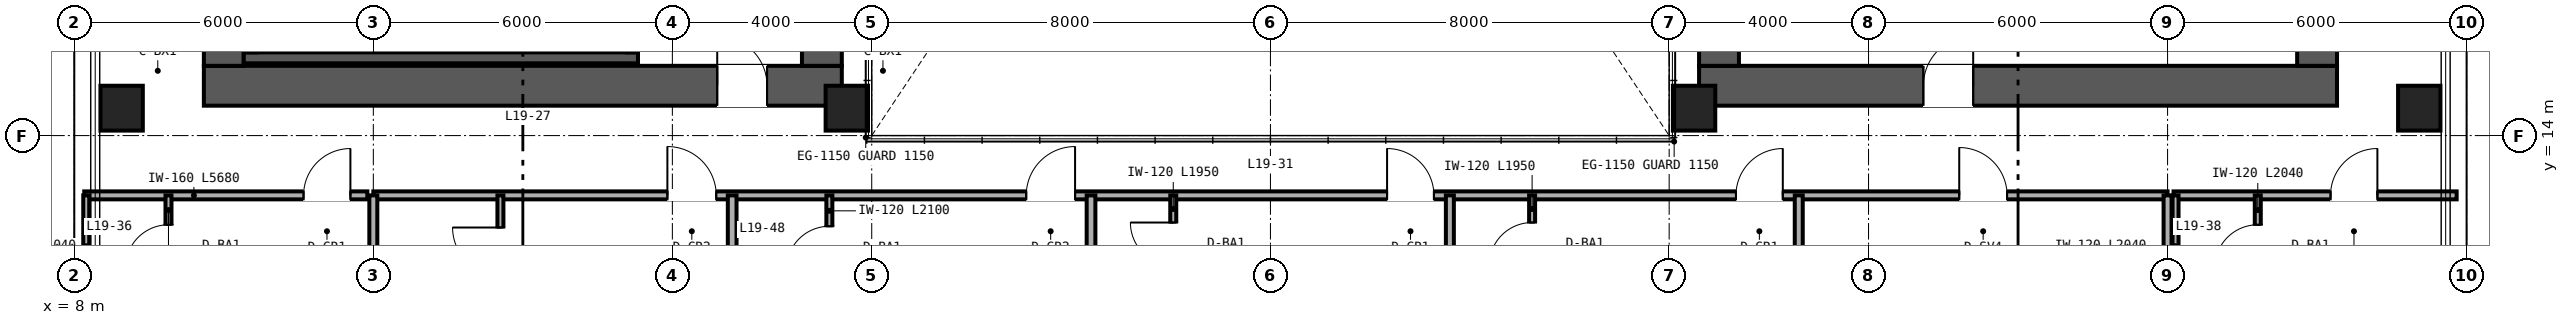
"""IFC4 building model, lengths in metres.
Left out: names, types, materials, properties, quantities, classifications, styles, units other than length and angle.
Written with IfcOpenShell. Run it as: python <this file> out.ifc"""

import sys

from ifc_helpers import new_model, si_unit, direction, frame, frame_2d, origin, origin_2d, place, context, subcontext, project, spatial, rectangle, hollow_rectangle, extrude, source, transform, mapped, element, fill, save


model = new_model("IFC4")
c1 = context("Model", 3, precision=1e-05, world=origin(), true_north=direction((0.0, 1.0)))
c2 = subcontext(c1, "Body", "Model", "MODEL_VIEW")
j1 = project(units=[si_unit("LENGTHUNIT", "METRE"), si_unit("PLANEANGLEUNIT", "RADIAN")], contexts=[c1])
p1 = place(None, origin())
s1 = spatial("IfcSite", under=j1, at=p1, CompositionType="ELEMENT")
p2 = place(p1, origin())
s2 = spatial("IfcBuilding", under=s1, at=p2, CompositionType="ELEMENT")
p3 = place(p2, frame((0.0, 0.0, 78.0)))
s3 = spatial("IfcBuildingStorey", under=s2, at=p3, CompositionType="ELEMENT", Elevation=78.0)
p4 = place(p3, frame((10.6, 15.0, 0.0), z_axis=(0.0, 0.0, 1.0), x_axis=(1.0, 0.0, 0.0)))
e1 = element("IfcWall", 1, at=p4, inside=s3, PredefinedType="SHEAR", context=c2, shape_type="SweptSolid", body=[
    extrude(rectangle(XDim=12.8, YDim=0.8, at=frame_2d((6.4, 0.0))), origin(), (0.0, 0.0, 1.0), 3.35),
])
p5 = place(p4, frame((10.3, 0.0, 0.0)))
e2 = element("IfcOpeningElement", 2, at=p5, cuts=e1, PredefinedType="OPENING", context=c2, shape_type="SweptSolid", body=[
    extrude(rectangle(XDim=1.0, YDim=2.15, at=frame_2d((0.5, 1.075))), frame((0.0, 0.41, 0.0), z_axis=(0.0, -1.0, 0.0), x_axis=(1.0, 0.0, 0.0)), (0.0, 0.0, 1.0), 0.82),
])
for number, where, z_axis, x_axis in (
    (3, (11.0, 15.4, 0.0), (0.0, 0.0, 1.0), (0.0, 1.0, 0.0)),
    (4, (23.0, 15.4, 0.0), (0.0, 0.0, 1.0), (0.0, 1.0, 0.0)),
):
    element("IfcWall", number, at=place(p3, frame(where, z_axis=z_axis, x_axis=x_axis)), inside=s3, PredefinedType="SHEAR", context=c2, shape_type="SweptSolid", body=[
        extrude(rectangle(XDim=21.2, YDim=0.8, at=frame_2d((10.6, 0.0))), origin(), (0.0, 0.0, 1.0), 3.35),
    ])
p6 = place(p3, frame((40.6, 15.0, 0.0), z_axis=(0.0, 0.0, 1.0), x_axis=(1.0, 0.0, 0.0)))
e5 = element("IfcWall", 5, at=p6, inside=s3, PredefinedType="SHEAR", context=c2, shape_type="SweptSolid", body=[
    extrude(rectangle(XDim=12.8, YDim=0.8, at=frame_2d((6.4, 0.0))), origin(), (0.0, 0.0, 1.0), 3.35),
])
p7 = place(p6, frame((4.5, 0.0, 0.0)))
e6 = element("IfcOpeningElement", 6, at=p7, cuts=e5, PredefinedType="OPENING", context=c2, shape_type="SweptSolid", body=[
    extrude(rectangle(XDim=1.0, YDim=2.15, at=frame_2d((0.5, 1.075))), frame((0.0, 0.41, 0.0), z_axis=(0.0, -1.0, 0.0), x_axis=(1.0, 0.0, 0.0)), (0.0, 0.0, 1.0), 0.82),
])
for number, where, z_axis, x_axis in (
    (7, (41.0, 15.4, 0.0), (0.0, 0.0, 1.0), (0.0, 1.0, 0.0)),
    (8, (53.0, 15.4, 0.0), (0.0, 0.0, 1.0), (0.0, 1.0, 0.0)),
):
    element("IfcWall", number, at=place(p3, frame(where, z_axis=z_axis, x_axis=x_axis)), inside=s3, PredefinedType="SHEAR", context=c2, shape_type="SweptSolid", body=[
        extrude(rectangle(XDim=21.2, YDim=0.8, at=frame_2d((10.6, 0.0))), origin(), (0.0, 0.0, 1.0), 3.35),
    ])
p8 = place(p3, frame((11.4, 15.56, 0.0), z_axis=(0.0, 0.0, 1.0), x_axis=(1.0, 0.0, 0.0)))
e9 = element("IfcWall", 9, at=p8, inside=s3, PredefinedType="SHEAR", context=c2, shape_type="SweptSolid", body=[
    extrude(rectangle(XDim=7.91, YDim=0.22, at=frame_2d((3.955, 0.0))), origin(), (0.0, 0.0, 1.0), 3.4),
])
for number, where, z_axis, x_axis in (
    (10, (11.56, 15.67, 0.0), (0.0, 0.0, 1.0), (0.0, 1.0, 0.0)),
    (11, (19.2, 15.67, 0.0), (0.0, 0.0, 1.0), (0.0, 1.0, 0.0)),
):
    element("IfcWall", number, at=place(p3, frame(where, z_axis=z_axis, x_axis=x_axis)), inside=s3, PredefinedType="SHEAR", context=c2, shape_type="SweptSolid", body=[
        extrude(rectangle(XDim=3.28, YDim=0.22, at=frame_2d((1.64, 0.0))), origin(), (0.0, 0.0, 1.0), 3.4),
    ])
m1 = source(origin(), c2, "Body", "SweptSolid", [
    extrude(hollow_rectangle(XDim=0.85, YDim=0.9, WallThickness=0.04, at=origin_2d()), origin(), (0.0, 0.0, 1.0), 3.35),
])
for number, where, z_axis, x_axis in (
    (12, (8.95, 14.55, 0.0), (0.0, 0.0, 1.0), (1.0, 0.0, 0.0)),
    (13, (23.5, 14.55, 0.0), (0.0, 0.0, 1.0), (1.0, 0.0, 0.0)),
    (14, (40.5, 14.55, 0.0), (0.0, 0.0, 1.0), (1.0, 0.0, 0.0)),
    (15, (55.05, 14.55, 0.0), (0.0, 0.0, 1.0), (1.0, 0.0, 0.0)),
):
    element("IfcColumn", number, at=place(p3, frame(where, z_axis=z_axis, x_axis=x_axis)), inside=s3, PredefinedType="COLUMN", context=c2, shape_type="MappedRepresentation", body=[
        mapped(m1, transform((0.0, 0.0, 0.0), scale=1.0)),
    ])
p9 = place(p3, frame((8.2, 12.8, 0.0), z_axis=(0.0, 0.0, 1.0), x_axis=(1.0, 0.0, 0.0)))
e16 = element("IfcWall", 16, at=p9, inside=s3, PredefinedType="PARTITIONING", context=c2, shape_type="SweptSolid", body=[
    extrude(rectangle(XDim=5.68, YDim=0.16, at=frame_2d((2.84, 0.0))), origin(), (0.0, 0.0, 1.0), 3.35),
])
p10 = place(p9, frame((4.4, 0.0, 0.0)))
e17 = element("IfcOpeningElement", 17, at=p10, cuts=e16, PredefinedType="OPENING", context=c2, shape_type="SweptSolid", body=[
    extrude(rectangle(XDim=0.94, YDim=2.15, at=frame_2d((0.47, 1.075))), frame((0.0, 0.09, 0.0), z_axis=(0.0, -1.0, 0.0), x_axis=(1.0, 0.0, 0.0)), (0.0, 0.0, 1.0), 0.18),
])
p11 = place(p3, frame((9.89, 10.76, 0.0), z_axis=(0.0, 0.0, 1.0), x_axis=(0.0, 1.0, 0.0)))
e18 = element("IfcWall", 18, at=p11, inside=s3, PredefinedType="PARTITIONING", context=c2, shape_type="SweptSolid", body=[
    extrude(rectangle(XDim=2.04, YDim=0.12, at=frame_2d((1.02, 0.0))), origin(), (0.0, 0.0, 1.0), 3.35),
])
p12 = place(p11, frame((0.59, 0.0, 0.0)))
e19 = element("IfcOpeningElement", 19, at=p12, cuts=e18, PredefinedType="OPENING", context=c2, shape_type="SweptSolid", body=[
    extrude(rectangle(XDim=0.86, YDim=2.1, at=frame_2d((0.43, 1.05))), frame((0.0, 0.07, 0.0), z_axis=(0.0, -1.0, 0.0), x_axis=(1.0, 0.0, 0.0)), (0.0, 0.0, 1.0), 0.14),
])
p13 = place(p3, frame((8.24, 10.76, 0.0), z_axis=(0.0, 0.0, 1.0), x_axis=(0.0, 1.0, 0.0)))
e20 = element("IfcWall", 20, at=p13, inside=s3, PredefinedType="PARTITIONING", context=c2, shape_type="SweptSolid", body=[
    extrude(rectangle(XDim=2.04, YDim=0.12, at=frame_2d((1.02, 0.0))), origin(), (0.0, 0.0, 1.0), 3.35),
])
p14 = place(p3, frame((50.12, 12.8, 0.0), z_axis=(0.0, 0.0, 1.0), x_axis=(1.0, 0.0, 0.0)))
e21 = element("IfcWall", 21, at=p14, inside=s3, PredefinedType="PARTITIONING", context=c2, shape_type="SweptSolid", body=[
    extrude(rectangle(XDim=5.68, YDim=0.16, at=frame_2d((2.84, 0.0))), origin(), (0.0, 0.0, 1.0), 3.35),
])
p15 = place(p14, frame((3.15, 0.0, 0.0)))
e22 = element("IfcOpeningElement", 22, at=p15, cuts=e21, PredefinedType="OPENING", context=c2, shape_type="SweptSolid", body=[
    extrude(rectangle(XDim=0.94, YDim=2.15, at=frame_2d((0.47, 1.075))), frame((0.0, 0.09, 0.0), z_axis=(0.0, -1.0, 0.0), x_axis=(1.0, 0.0, 0.0)), (0.0, 0.0, 1.0), 0.18),
])
p16 = place(p3, frame((51.81, 10.76, 0.0), z_axis=(0.0, 0.0, 1.0), x_axis=(0.0, 1.0, 0.0)))
e23 = element("IfcWall", 23, at=p16, inside=s3, PredefinedType="PARTITIONING", context=c2, shape_type="SweptSolid", body=[
    extrude(rectangle(XDim=2.04, YDim=0.12, at=frame_2d((1.02, 0.0))), origin(), (0.0, 0.0, 1.0), 3.35),
])
p17 = place(p16, frame((0.59, 0.0, 0.0)))
e24 = element("IfcOpeningElement", 24, at=p17, cuts=e23, PredefinedType="OPENING", context=c2, shape_type="SweptSolid", body=[
    extrude(rectangle(XDim=0.86, YDim=2.1, at=frame_2d((0.43, 1.05))), frame((0.0, 0.07, 0.0), z_axis=(0.0, -1.0, 0.0), x_axis=(1.0, 0.0, 0.0)), (0.0, 0.0, 1.0), 0.14),
])
p18 = place(p3, frame((50.16, 10.76, 0.0), z_axis=(0.0, 0.0, 1.0), x_axis=(0.0, 1.0, 0.0)))
e25 = element("IfcWall", 25, at=p18, inside=s3, PredefinedType="PARTITIONING", context=c2, shape_type="SweptSolid", body=[
    extrude(rectangle(XDim=2.04, YDim=0.12, at=frame_2d((1.02, 0.0))), origin(), (0.0, 0.0, 1.0), 3.35),
])
p19 = place(p3, frame((14.0, 12.8, 0.0), z_axis=(0.0, 0.0, 1.0), x_axis=(1.0, 0.0, 0.0)))
e26 = element("IfcWall", 26, at=p19, inside=s3, PredefinedType="PARTITIONING", context=c2, shape_type="SweptSolid", body=[
    extrude(rectangle(XDim=36.0, YDim=0.16, at=frame_2d((18.0, 0.0))), origin(), (0.0, 0.0, 1.0), 2.571),
])
p20 = place(p19, frame((5.9, 0.0, 0.0)))
e27 = element("IfcOpeningElement", 27, at=p20, cuts=e26, PredefinedType="OPENING", context=c2, shape_type="SweptSolid", body=[
    extrude(rectangle(XDim=0.98, YDim=2.2, at=frame_2d((0.49, 1.1))), frame((0.0, 0.09, 0.0), z_axis=(0.0, -1.0, 0.0), x_axis=(1.0, 0.0, 0.0)), (0.0, 0.0, 1.0), 0.18),
])
p21 = place(p19, frame((13.1, 0.0, 0.0)))
e28 = element("IfcOpeningElement", 28, at=p21, cuts=e26, PredefinedType="OPENING", context=c2, shape_type="SweptSolid", body=[
    extrude(rectangle(XDim=0.98, YDim=2.2, at=frame_2d((0.49, 1.1))), frame((0.0, 0.09, 0.0), z_axis=(0.0, -1.0, 0.0), x_axis=(1.0, 0.0, 0.0)), (0.0, 0.0, 1.0), 0.18),
])
p22 = place(p19, frame((20.34, 0.0, 0.0)))
e29 = element("IfcOpeningElement", 29, at=p22, cuts=e26, PredefinedType="OPENING", context=c2, shape_type="SweptSolid", body=[
    extrude(rectangle(XDim=0.94, YDim=2.15, at=frame_2d((0.47, 1.075))), frame((0.0, 0.09, 0.0), z_axis=(0.0, -1.0, 0.0), x_axis=(1.0, 0.0, 0.0)), (0.0, 0.0, 1.0), 0.18),
])
p23 = place(p19, frame((27.34, 0.0, 0.0)))
e30 = element("IfcOpeningElement", 30, at=p23, cuts=e26, PredefinedType="OPENING", context=c2, shape_type="SweptSolid", body=[
    extrude(rectangle(XDim=0.94, YDim=2.15, at=frame_2d((0.47, 1.075))), frame((0.0, 0.09, 0.0), z_axis=(0.0, -1.0, 0.0), x_axis=(1.0, 0.0, 0.0)), (0.0, 0.0, 1.0), 0.18),
])
p24 = place(p19, frame((31.82, 0.0, 0.0)))
e31 = element("IfcOpeningElement", 31, at=p24, cuts=e26, PredefinedType="OPENING", context=c2, shape_type="SweptSolid", body=[
    extrude(rectangle(XDim=0.96, YDim=2.15, at=frame_2d((0.48, 1.075))), frame((0.0, 0.09, 0.0), z_axis=(0.0, -1.0, 0.0), x_axis=(1.0, 0.0, 0.0)), (0.0, 0.0, 1.0), 0.18),
])
for number, where, z_axis, x_axis in (
    (32, (14.0, 2.36, 0.0), (0.0, 0.0, 1.0), (0.0, 1.0, 0.0)),
    (33, (50.0, 2.36, 0.0), (0.0, 0.0, 1.0), (0.0, 1.0, 0.0)),
):
    element("IfcWall", number, at=place(p3, frame(where, z_axis=z_axis, x_axis=x_axis)), inside=s3, PredefinedType="PARTITIONING", context=c2, shape_type="SweptSolid", body=[
        extrude(rectangle(XDim=10.44, YDim=0.16, at=frame_2d((5.22, 0.0))), origin(), (0.0, 0.0, 1.0), 2.657),
    ])
p25 = place(p3, frame((21.2, 2.36, 0.0), z_axis=(0.0, 0.0, 1.0), x_axis=(0.0, 1.0, 0.0)))
e34 = element("IfcWall", 34, at=p25, inside=s3, PredefinedType="PARTITIONING", context=c2, shape_type="SweptSolid", body=[
    extrude(rectangle(XDim=10.44, YDim=0.175, at=frame_2d((5.22, 0.0))), origin(), (0.0, 0.0, 1.0), 2.813),
])
p26 = place(p3, frame((16.55, 10.55, 0.0), z_axis=(0.0, 0.0, 1.0), x_axis=(0.0, 1.0, 0.0)))
e35 = element("IfcWall", 35, at=p26, inside=s3, PredefinedType="PARTITIONING", context=c2, shape_type="SweptSolid", body=[
    extrude(rectangle(XDim=2.25, YDim=0.12, at=frame_2d((1.125, 0.0))), origin(), (0.0, 0.0, 1.0), 3.35),
])
p27 = place(p26, frame((0.645, 0.0, 0.0)))
e36 = element("IfcOpeningElement", 36, at=p27, cuts=e35, PredefinedType="OPENING", context=c2, shape_type="SweptSolid", body=[
    extrude(rectangle(XDim=0.96, YDim=2.15, at=frame_2d((0.48, 1.075))), frame((0.0, 0.07, 0.0), z_axis=(0.0, -1.0, 0.0), x_axis=(1.0, 0.0, 0.0)), (0.0, 0.0, 1.0), 0.14),
])
p28 = place(p3, frame((28.4, 2.36, 0.0), z_axis=(0.0, 0.0, 1.0), x_axis=(0.0, 1.0, 0.0)))
e37 = element("IfcWall", 37, at=p28, inside=s3, PredefinedType="PARTITIONING", context=c2, shape_type="SweptSolid", body=[
    extrude(rectangle(XDim=10.44, YDim=0.175, at=frame_2d((5.22, 0.0))), origin(), (0.0, 0.0, 1.0), 2.423),
])
p29 = place(p3, frame((23.15, 10.7, 0.0), z_axis=(0.0, 0.0, 1.0), x_axis=(0.0, 1.0, 0.0)))
e38 = element("IfcWall", 38, at=p29, inside=s3, PredefinedType="PARTITIONING", context=c2, shape_type="SweptSolid", body=[
    extrude(rectangle(XDim=2.1, YDim=0.12, at=frame_2d((1.05, 0.0))), origin(), (0.0, 0.0, 1.0), 3.35),
])
p30 = place(p29, frame((0.62, 0.0, 0.0)))
e39 = element("IfcOpeningElement", 39, at=p30, cuts=e38, PredefinedType="OPENING", context=c2, shape_type="SweptSolid", body=[
    extrude(rectangle(XDim=0.86, YDim=2.1, at=frame_2d((0.43, 1.05))), frame((0.0, 0.07, 0.0), z_axis=(0.0, -1.0, 0.0), x_axis=(1.0, 0.0, 0.0)), (0.0, 0.0, 1.0), 0.14),
])
p31 = place(p3, frame((35.6, 2.36, 0.0), z_axis=(0.0, 0.0, 1.0), x_axis=(0.0, 1.0, 0.0)))
e40 = element("IfcWall", 40, at=p31, inside=s3, PredefinedType="PARTITIONING", context=c2, shape_type="SweptSolid", body=[
    extrude(rectangle(XDim=10.44, YDim=0.16, at=frame_2d((5.22, 0.0))), origin(), (0.0, 0.0, 1.0), 2.423),
])
p32 = place(p3, frame((30.05, 10.85, 0.0), z_axis=(0.0, 0.0, 1.0), x_axis=(0.0, 1.0, 0.0)))
e41 = element("IfcWall", 41, at=p32, inside=s3, PredefinedType="PARTITIONING", context=c2, shape_type="SweptSolid", body=[
    extrude(rectangle(XDim=1.95, YDim=0.12, at=frame_2d((0.975, 0.0))), origin(), (0.0, 0.0, 1.0), 3.35),
])
p33 = place(p32, frame((0.545, 0.0, 0.0)))
e42 = element("IfcOpeningElement", 42, at=p33, cuts=e41, PredefinedType="OPENING", context=c2, shape_type="SweptSolid", body=[
    extrude(rectangle(XDim=0.86, YDim=2.1, at=frame_2d((0.43, 1.05))), frame((0.0, 0.07, 0.0), z_axis=(0.0, -1.0, 0.0), x_axis=(1.0, 0.0, 0.0)), (0.0, 0.0, 1.0), 0.14),
])
p34 = place(p3, frame((42.6, 2.36, 0.0), z_axis=(0.0, 0.0, 1.0), x_axis=(0.0, 1.0, 0.0)))
e43 = element("IfcWall", 43, at=p34, inside=s3, PredefinedType="PARTITIONING", context=c2, shape_type="SweptSolid", body=[
    extrude(rectangle(XDim=10.44, YDim=0.16, at=frame_2d((5.22, 0.0))), origin(), (0.0, 0.0, 1.0), 2.813),
])
p35 = place(p3, frame((37.25, 10.85, 0.0), z_axis=(0.0, 0.0, 1.0), x_axis=(0.0, 1.0, 0.0)))
e44 = element("IfcWall", 44, at=p35, inside=s3, PredefinedType="PARTITIONING", context=c2, shape_type="SweptSolid", body=[
    extrude(rectangle(XDim=1.95, YDim=0.12, at=frame_2d((0.975, 0.0))), origin(), (0.0, 0.0, 1.0), 3.35),
])
p36 = place(p35, frame((0.545, 0.0, 0.0)))
e45 = element("IfcOpeningElement", 45, at=p36, cuts=e44, PredefinedType="OPENING", context=c2, shape_type="SweptSolid", body=[
    extrude(rectangle(XDim=0.86, YDim=2.1, at=frame_2d((0.43, 1.05))), frame((0.0, 0.07, 0.0), z_axis=(0.0, -1.0, 0.0), x_axis=(1.0, 0.0, 0.0)), (0.0, 0.0, 1.0), 0.14),
])
m2 = source(origin(), c2, "Body", "SweptSolid", [
    extrude(rectangle(XDim=1.0, YDim=2.15, at=frame_2d((0.5, 1.075))), frame((0.0, 0.025, 0.0), z_axis=(0.0, -1.0, 0.0), x_axis=(1.0, 0.0, 0.0)), (0.0, 0.0, 1.0), 0.05),
])
p37 = place(p5, origin())
e46 = element("IfcDoor", 46, at=p37, inside=s3, OperationType="SINGLE_SWING_LEFT", PredefinedType="DOOR", context=c2, shape_type="MappedRepresentation", body=[
    mapped(m2, transform((0.0, 0.0, 0.0), scale=1.0)),
])
fill(e2, e46)
p38 = place(p7, origin())
e47 = element("IfcDoor", 47, at=p38, inside=s3, OperationType="SINGLE_SWING_RIGHT", PredefinedType="DOOR", context=c2, shape_type="MappedRepresentation", body=[
    mapped(m2, transform((0.0, 0.0, 0.0), scale=1.0)),
])
fill(e6, e47)
m3 = source(origin(), c2, "Body", "SweptSolid", [
    extrude(rectangle(XDim=0.86, YDim=2.1, at=frame_2d((0.43, 1.05))), frame((0.0, 0.025, 0.0), z_axis=(0.0, -1.0, 0.0), x_axis=(1.0, 0.0, 0.0)), (0.0, 0.0, 1.0), 0.05),
])
p39 = place(p12, origin())
e48 = element("IfcDoor", 48, at=p39, inside=s3, OperationType="SINGLE_SWING_LEFT", PredefinedType="DOOR", context=c2, shape_type="MappedRepresentation", body=[
    mapped(m3, transform((0.0, 0.0, 0.0), scale=1.0)),
])
fill(e19, e48)
m4 = source(origin(), c2, "Body", "SweptSolid", [
    extrude(rectangle(XDim=0.94, YDim=2.15, at=frame_2d((0.47, 1.075))), frame((0.0, 0.025, 0.0), z_axis=(0.0, -1.0, 0.0), x_axis=(1.0, 0.0, 0.0)), (0.0, 0.0, 1.0), 0.05),
])
p40 = place(p10, origin())
e49 = element("IfcDoor", 49, at=p40, inside=s3, OperationType="SINGLE_SWING_RIGHT", PredefinedType="DOOR", context=c2, shape_type="MappedRepresentation", body=[
    mapped(m4, transform((0.0, 0.0, 0.0), scale=1.0)),
])
fill(e17, e49)
p41 = place(p17, origin())
e50 = element("IfcDoor", 50, at=p41, inside=s3, OperationType="SINGLE_SWING_LEFT", PredefinedType="DOOR", context=c2, shape_type="MappedRepresentation", body=[
    mapped(m3, transform((0.0, 0.0, 0.0), scale=1.0)),
])
fill(e24, e50)
p42 = place(p15, origin())
e51 = element("IfcDoor", 51, at=p42, inside=s3, OperationType="SINGLE_SWING_RIGHT", PredefinedType="DOOR", context=c2, shape_type="MappedRepresentation", body=[
    mapped(m4, transform((0.0, 0.0, 0.0), scale=1.0)),
])
fill(e22, e51)
m5 = source(origin(), c2, "Body", "SweptSolid", [
    extrude(rectangle(XDim=0.96, YDim=2.15, at=frame_2d((0.48, 1.075))), frame((0.0, 0.025, 0.0), z_axis=(0.0, -1.0, 0.0), x_axis=(1.0, 0.0, 0.0)), (0.0, 0.0, 1.0), 0.05),
])
p43 = place(p27, origin())
e52 = element("IfcDoor", 52, at=p43, inside=s3, OperationType="SINGLE_SWING_RIGHT", PredefinedType="DOOR", context=c2, shape_type="MappedRepresentation", body=[
    mapped(m5, transform((0.0, 0.0, 0.0), scale=1.0)),
])
fill(e36, e52)
p44 = place(p30, origin())
e53 = element("IfcDoor", 53, at=p44, inside=s3, OperationType="SINGLE_SWING_LEFT", PredefinedType="DOOR", context=c2, shape_type="MappedRepresentation", body=[
    mapped(m3, transform((0.0, 0.0, 0.0), scale=1.0)),
])
fill(e39, e53)
p45 = place(p33, origin())
e54 = element("IfcDoor", 54, at=p45, inside=s3, OperationType="SINGLE_SWING_RIGHT", PredefinedType="DOOR", context=c2, shape_type="MappedRepresentation", body=[
    mapped(m3, transform((0.0, 0.0, 0.0), scale=1.0)),
])
fill(e42, e54)
p46 = place(p36, origin())
e55 = element("IfcDoor", 55, at=p46, inside=s3, OperationType="SINGLE_SWING_LEFT", PredefinedType="DOOR", context=c2, shape_type="MappedRepresentation", body=[
    mapped(m3, transform((0.0, 0.0, 0.0), scale=1.0)),
])
fill(e45, e55)
m6 = source(origin(), c2, "Body", "SweptSolid", [
    extrude(rectangle(XDim=0.98, YDim=2.2, at=frame_2d((0.49, 1.1))), frame((0.0, 0.025, 0.0), z_axis=(0.0, -1.0, 0.0), x_axis=(1.0, 0.0, 0.0)), (0.0, 0.0, 1.0), 0.05),
])
p47 = place(p20, origin())
e56 = element("IfcDoor", 56, at=p47, inside=s3, OperationType="SINGLE_SWING_LEFT", PredefinedType="DOOR", context=c2, shape_type="MappedRepresentation", body=[
    mapped(m6, transform((0.0, 0.0, 0.0), scale=1.0)),
])
fill(e27, e56)
p48 = place(p21, origin())
e57 = element("IfcDoor", 57, at=p48, inside=s3, OperationType="SINGLE_SWING_RIGHT", PredefinedType="DOOR", context=c2, shape_type="MappedRepresentation", body=[
    mapped(m6, transform((0.0, 0.0, 0.0), scale=1.0)),
])
fill(e28, e57)
p49 = place(p22, origin())
e58 = element("IfcDoor", 58, at=p49, inside=s3, OperationType="SINGLE_SWING_LEFT", PredefinedType="DOOR", context=c2, shape_type="MappedRepresentation", body=[
    mapped(m4, transform((0.0, 0.0, 0.0), scale=1.0)),
])
fill(e29, e58)
p50 = place(p23, origin())
e59 = element("IfcDoor", 59, at=p50, inside=s3, OperationType="SINGLE_SWING_RIGHT", PredefinedType="DOOR", context=c2, shape_type="MappedRepresentation", body=[
    mapped(m4, transform((0.0, 0.0, 0.0), scale=1.0)),
])
fill(e30, e59)
p51 = place(p24, origin())
e60 = element("IfcDoor", 60, at=p51, inside=s3, OperationType="SINGLE_SWING_LEFT", PredefinedType="DOOR", context=c2, shape_type="MappedRepresentation", body=[
    mapped(m5, transform((0.0, 0.0, 0.0), scale=1.0)),
])
fill(e31, e60)
save(model, sys.argv[1])
